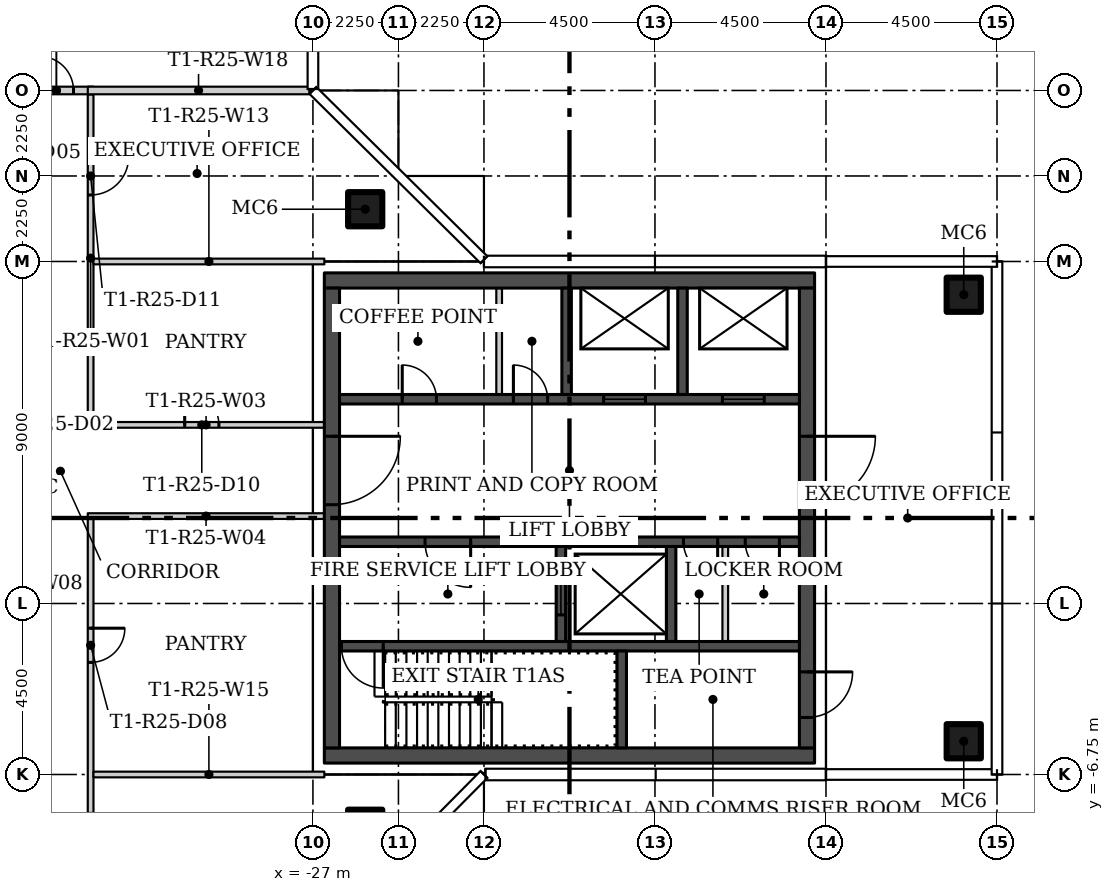
"""IFC4 building model, lengths in metres.
Left out: names, types, materials, properties, quantities, classifications, styles, units other than length and angle.
Written with IfcOpenShell. Run it as: python <this file> out.ifc"""

import sys

from ifc_helpers import new_model, si_unit, direction, frame, frame_2d, origin, origin_2d, place, context, subcontext, project, spatial, rectangle, hollow_rectangle, extrude, element, fill, save


model = new_model("IFC4")
c1 = context("Model", 3, precision=1e-05, world=origin(), true_north=direction((0.0, 1.0)))
c2 = subcontext(c1, "Body", "Model", "MODEL_VIEW")
j1 = project(units=[si_unit("LENGTHUNIT", "METRE"), si_unit("PLANEANGLEUNIT", "RADIAN")], contexts=[c1])
p1 = place(None, origin())
s1 = spatial("IfcSite", under=j1, at=p1, CompositionType="ELEMENT")
p2 = place(p1, origin())
s2 = spatial("IfcBuilding", under=s1, at=p2, CompositionType="ELEMENT")
p3 = place(p2, frame((0.0, 0.0, 230.4)))
s3 = spatial("IfcBuildingStorey", under=s2, at=p3, CompositionType="ELEMENT", Elevation=230.4)
for number, where in (
    (1, (-25.625, 8.125, 0.0)),
    (2, (-25.625, -8.125, 0.0)),
    (3, (-9.875, -5.875, 0.0)),
    (4, (-9.875, 5.875, 0.0)),
):
    element("IfcColumn", number, at=place(p3, frame(where)), inside=s3, PredefinedType="COLUMN", context=c2, shape_type="SweptSolid", body=[
        extrude(hollow_rectangle(XDim=0.9, YDim=0.9, WallThickness=0.036, at=origin_2d()), origin(), (0.0, 0.0, 1.0), 3.55),
    ])
p4 = place(p3, frame((-32.85, 11.15, 0.0), z_axis=(0.0, 0.0, 1.0), x_axis=(0.0, -1.0, 0.0)))
e5 = element("IfcWall", 5, at=p4, inside=s3, PredefinedType="PARTITIONING", context=c2, shape_type="SweptSolid", body=[
    extrude(rectangle(XDim=8.625, YDim=0.15, at=frame_2d((4.312, 0.0))), origin(), (0.0, 0.0, 1.0), 3.55),
])
p5 = place(p4, frame((1.65, 0.0, 0.0)))
e6 = element("IfcOpeningElement", 6, at=p5, cuts=e5, PredefinedType="OPENING", context=c2, shape_type="SweptSolid", body=[
    extrude(rectangle(XDim=1.0, YDim=2.4, at=frame_2d((0.5, 1.2))), frame((0.0, 0.085, 0.0), z_axis=(0.0, -1.0, 0.0), x_axis=(1.0, 0.0, 0.0)), (0.0, 0.0, 1.0), 0.17),
])
p6 = place(p3, frame((-32.85, -0.025, 0.0), z_axis=(0.0, 0.0, 1.0), x_axis=(0.0, -1.0, 0.0)))
e7 = element("IfcWall", 7, at=p6, inside=s3, PredefinedType="PARTITIONING", context=c2, shape_type="SweptSolid", body=[
    extrude(rectangle(XDim=15.65, YDim=0.15, at=frame_2d((7.825, 0.0))), origin(), (0.0, 0.0, 1.0), 3.55),
])
p7 = place(p6, frame((2.875, 0.0, 0.0)))
e8 = element("IfcOpeningElement", 8, at=p7, cuts=e7, PredefinedType="OPENING", context=c2, shape_type="SweptSolid", body=[
    extrude(rectangle(XDim=0.9, YDim=2.1, at=frame_2d((0.45, 1.05))), frame((0.0, 0.085, 0.0), z_axis=(0.0, -1.0, 0.0), x_axis=(1.0, 0.0, 0.0)), (0.0, 0.0, 1.0), 0.17),
])
p8 = place(p6, frame((10.725, 0.0, 0.0)))
e9 = element("IfcOpeningElement", 9, at=p8, cuts=e7, PredefinedType="OPENING", context=c2, shape_type="SweptSolid", body=[
    extrude(rectangle(XDim=1.0, YDim=2.4, at=frame_2d((0.5, 1.2))), frame((0.0, 0.085, 0.0), z_axis=(0.0, -1.0, 0.0), x_axis=(1.0, 0.0, 0.0)), (0.0, 0.0, 1.0), 0.17),
])
p9 = place(p3, frame((-32.925, 2.45, 0.0)))
e10 = element("IfcWall", 10, at=p9, inside=s3, PredefinedType="PARTITIONING", context=c2, shape_type="SweptSolid", body=[
    extrude(rectangle(XDim=6.225, YDim=0.15, at=frame_2d((3.112, 0.0))), origin(), (0.0, 0.0, 1.0), 3.55),
])
p10 = place(p9, frame((2.55, 0.0, 0.0)))
e11 = element("IfcOpeningElement", 11, at=p10, cuts=e10, PredefinedType="OPENING", context=c2, shape_type="SweptSolid", body=[
    extrude(rectangle(XDim=0.9, YDim=2.1, at=frame_2d((0.45, 1.05))), frame((0.0, 0.085, 0.0), z_axis=(0.0, -1.0, 0.0), x_axis=(1.0, 0.0, 0.0)), (0.0, 0.0, 1.0), 0.17),
])
p11 = place(p3, frame((-26.7, 0.05, 0.0), z_axis=(0.0, 0.0, 1.0), x_axis=(-1.0, 0.0, 0.0)))
e12 = element("IfcWall", 12, at=p11, inside=s3, PredefinedType="PARTITIONING", context=c2, shape_type="SweptSolid", body=[
    extrude(rectangle(XDim=6.225, YDim=0.15, at=frame_2d((3.112, 0.0))), origin(), (0.0, 0.0, 1.0), 3.55),
])
p12 = place(p3, frame((-34.725, 11.25, 0.0)))
e13 = element("IfcWall", 13, at=p12, inside=s3, PredefinedType="PARTITIONING", context=c2, shape_type="SweptSolid", body=[
    extrude(rectangle(XDim=1.951, YDim=0.2, at=frame_2d((0.975, 0.0))), origin(), (0.0, 0.0, 1.0), 3.55),
])
p13 = place(p12, frame((0.525, 0.0, 0.0)))
e14 = element("IfcOpeningElement", 14, at=p13, cuts=e13, PredefinedType="OPENING", context=c2, shape_type="SweptSolid", body=[
    extrude(rectangle(XDim=0.9, YDim=2.4, at=frame_2d((0.45, 1.2))), frame((0.0, 0.11, 0.0), z_axis=(0.0, -1.0, 0.0), x_axis=(1.0, 0.0, 0.0)), (0.0, 0.0, 1.0), 0.22),
])
p14 = place(p3, frame((-26.7, 6.75, 0.0), z_axis=(0.0, 0.0, 1.0), x_axis=(-1.0, 0.0, 0.0)))
e15 = element("IfcWall", 15, at=p14, inside=s3, PredefinedType="PARTITIONING", context=c2, shape_type="SweptSolid", body=[
    extrude(rectangle(XDim=6.075, YDim=0.15, at=frame_2d((3.037, 0.0))), origin(), (0.0, 0.0, 1.0), 3.55),
])
p15 = place(p3, frame((-32.775, -6.75, 0.0)))
e16 = element("IfcWall", 16, at=p15, inside=s3, PredefinedType="PARTITIONING", context=c2, shape_type="SweptSolid", body=[
    extrude(rectangle(XDim=6.075, YDim=0.15, at=frame_2d((3.037, 0.0))), origin(), (0.0, 0.0, 1.0), 3.55),
])
p16 = place(p3, frame((-27.095, 11.25, 0.0), z_axis=(0.0, 0.0, 1.0), x_axis=(-1.0, 0.0, 0.0)))
e17 = element("IfcWall", 17, at=p16, inside=s3, PredefinedType="PARTITIONING", context=c2, shape_type="SweptSolid", body=[
    extrude(rectangle(XDim=5.83, YDim=0.2, at=frame_2d((2.915, 0.0))), origin(), (0.0, 0.0, 1.0), 3.55),
])
for number, where in (
    (18, (-26.7, -6.25, 0.0)),
    (19, (-26.7, 6.25, 0.0)),
):
    element("IfcWall", number, at=place(p3, frame(where)), inside=s3, PredefinedType="SHEAR", context=c2, shape_type="SweptSolid", body=[
        extrude(rectangle(XDim=12.9, YDim=0.4, at=frame_2d((6.45, 0.0))), origin(), (0.0, 0.0, 1.0), 3.55),
    ])
p17 = place(p3, frame((-26.5, 6.05, 0.0), z_axis=(0.0, 0.0, 1.0), x_axis=(0.0, -1.0, 0.0)))
e20 = element("IfcWall", 20, at=p17, inside=s3, PredefinedType="SHEAR", context=c2, shape_type="SweptSolid", body=[
    extrude(rectangle(XDim=12.1, YDim=0.4, at=frame_2d((6.05, 0.0))), origin(), (0.0, 0.0, 1.0), 3.55),
])
p18 = place(p17, frame((3.9, 0.0, 0.0)))
e21 = element("IfcOpeningElement", 21, at=p18, cuts=e20, PredefinedType="OPENING", context=c2, shape_type="SweptSolid", body=[
    extrude(rectangle(XDim=1.8, YDim=2.4, at=frame_2d((0.9, 1.2))), frame((0.0, 0.21, 0.0), z_axis=(0.0, -1.0, 0.0), x_axis=(1.0, 0.0, 0.0)), (0.0, 0.0, 1.0), 0.42),
])
p19 = place(p3, frame((-14.0, 6.05, 0.0), z_axis=(0.0, 0.0, 1.0), x_axis=(0.0, -1.0, 0.0)))
e22 = element("IfcWall", 22, at=p19, inside=s3, PredefinedType="SHEAR", context=c2, shape_type="SweptSolid", body=[
    extrude(rectangle(XDim=12.1, YDim=0.4, at=frame_2d((6.05, 0.0))), origin(), (0.0, 0.0, 1.0), 3.55),
])
p20 = place(p19, frame((10.1, 0.0, 0.0)))
e23 = element("IfcOpeningElement", 23, at=p20, cuts=e22, PredefinedType="OPENING", context=c2, shape_type="SweptSolid", body=[
    extrude(rectangle(XDim=1.2, YDim=2.1, at=frame_2d((0.6, 1.05))), frame((0.0, 0.21, 0.0), z_axis=(0.0, -1.0, 0.0), x_axis=(1.0, 0.0, 0.0)), (0.0, 0.0, 1.0), 0.42),
])
p21 = place(p19, frame((3.9, 0.0, 0.0)))
e24 = element("IfcOpeningElement", 24, at=p21, cuts=e22, PredefinedType="OPENING", context=c2, shape_type="SweptSolid", body=[
    extrude(rectangle(XDim=1.8, YDim=2.4, at=frame_2d((0.9, 1.2))), frame((0.0, 0.21, 0.0), z_axis=(0.0, -1.0, 0.0), x_axis=(1.0, 0.0, 0.0)), (0.0, 0.0, 1.0), 0.42),
])
p22 = place(p3, frame((-14.2, -3.375, 0.0), z_axis=(0.0, 0.0, 1.0), x_axis=(-1.0, 0.0, 0.0)))
e25 = element("IfcWall", 25, at=p22, inside=s3, PredefinedType="SHEAR", context=c2, shape_type="SweptSolid", body=[
    extrude(rectangle(XDim=12.1, YDim=0.25, at=frame_2d((6.05, 0.0))), origin(), (0.0, 0.0, 1.0), 3.55),
])
p23 = place(p22, frame((10.95, 0.0, 0.0)))
e26 = element("IfcOpeningElement", 26, at=p23, cuts=e25, PredefinedType="OPENING", context=c2, shape_type="SweptSolid", body=[
    extrude(rectangle(XDim=1.1, YDim=2.1, at=frame_2d((0.55, 1.05))), frame((0.0, 0.135, 0.0), z_axis=(0.0, -1.0, 0.0), x_axis=(1.0, 0.0, 0.0)), (0.0, 0.0, 1.0), 0.27),
])
p24 = place(p3, frame((-18.875, -6.05, 0.0), z_axis=(0.0, 0.0, 1.0), x_axis=(0.0, 1.0, 0.0)))
e27 = element("IfcWall", 27, at=p24, inside=s3, PredefinedType="SHEAR", context=c2, shape_type="SweptSolid", body=[
    extrude(rectangle(XDim=2.55, YDim=0.25, at=frame_2d((1.275, 0.0))), origin(), (0.0, 0.0, 1.0), 3.55),
])
p25 = place(p3, frame((-14.2, -0.625, 0.0), z_axis=(0.0, 0.0, 1.0), x_axis=(-1.0, 0.0, 0.0)))
e28 = element("IfcWall", 28, at=p25, inside=s3, PredefinedType="SHEAR", context=c2, shape_type="SweptSolid", body=[
    extrude(rectangle(XDim=12.1, YDim=0.25, at=frame_2d((6.05, 0.0))), origin(), (0.0, 0.0, 1.0), 3.55),
])
p26 = place(p25, frame((8.65, 0.0, 0.0)))
e29 = element("IfcOpeningElement", 29, at=p26, cuts=e28, PredefinedType="OPENING", context=c2, shape_type="SweptSolid", body=[
    extrude(rectangle(XDim=1.2, YDim=2.1, at=frame_2d((0.6, 1.05))), frame((0.0, 0.135, 0.0), z_axis=(0.0, -1.0, 0.0), x_axis=(1.0, 0.0, 0.0)), (0.0, 0.0, 1.0), 0.27),
])
p27 = place(p25, frame((2.15, 0.0, 0.0)))
e30 = element("IfcOpeningElement", 30, at=p27, cuts=e28, PredefinedType="OPENING", context=c2, shape_type="SweptSolid", body=[
    extrude(rectangle(XDim=0.9, YDim=2.1, at=frame_2d((0.45, 1.05))), frame((0.0, 0.135, 0.0), z_axis=(0.0, -1.0, 0.0), x_axis=(1.0, 0.0, 0.0)), (0.0, 0.0, 1.0), 0.27),
])
p28 = place(p25, frame((0.525, 0.0, 0.0)))
e31 = element("IfcOpeningElement", 31, at=p28, cuts=e28, PredefinedType="OPENING", context=c2, shape_type="SweptSolid", body=[
    extrude(rectangle(XDim=0.9, YDim=2.1, at=frame_2d((0.45, 1.05))), frame((0.0, 0.135, 0.0), z_axis=(0.0, -1.0, 0.0), x_axis=(1.0, 0.0, 0.0)), (0.0, 0.0, 1.0), 0.27),
])
p29 = place(p3, frame((-20.475, -3.25, 0.0), z_axis=(0.0, 0.0, 1.0), x_axis=(0.0, 1.0, 0.0)))
e32 = element("IfcWall", 32, at=p29, inside=s3, PredefinedType="SHEAR", context=c2, shape_type="SweptSolid", body=[
    extrude(rectangle(XDim=2.5, YDim=0.25, at=frame_2d((1.25, 0.0))), origin(), (0.0, 0.0, 1.0), 3.55),
])
p30 = place(p29, frame((0.7, 0.0, 0.0)))
e33 = element("IfcOpeningElement", 33, at=p30, cuts=e32, PredefinedType="OPENING", context=c2, shape_type="SweptSolid", body=[
    extrude(rectangle(XDim=1.1, YDim=2.1, at=frame_2d((0.55, 1.05))), frame((0.0, 0.135, 0.0), z_axis=(0.0, -1.0, 0.0), x_axis=(1.0, 0.0, 0.0)), (0.0, 0.0, 1.0), 0.27),
])
p31 = place(p3, frame((-17.575, -3.25, 0.0), z_axis=(0.0, 0.0, 1.0), x_axis=(0.0, 1.0, 0.0)))
e34 = element("IfcWall", 34, at=p31, inside=s3, PredefinedType="SHEAR", context=c2, shape_type="SweptSolid", body=[
    extrude(rectangle(XDim=2.5, YDim=0.25, at=frame_2d((1.25, 0.0))), origin(), (0.0, 0.0, 1.0), 3.55),
])
p32 = place(p3, frame((-16.15, -3.25, 0.0), z_axis=(0.0, 0.0, 1.0), x_axis=(0.0, 1.0, 0.0)))
e35 = element("IfcWall", 35, at=p32, inside=s3, PredefinedType="PARTITIONING", context=c2, shape_type="SweptSolid", body=[
    extrude(rectangle(XDim=2.5, YDim=0.15, at=frame_2d((1.25, 0.0))), origin(), (0.0, 0.0, 1.0), 3.55),
])
p33 = place(p3, frame((-26.3, 3.125, 0.0)))
e36 = element("IfcWall", 36, at=p33, inside=s3, PredefinedType="SHEAR", context=c2, shape_type="SweptSolid", body=[
    extrude(rectangle(XDim=12.1, YDim=0.25, at=frame_2d((6.05, 0.0))), origin(), (0.0, 0.0, 1.0), 3.55),
])
p34 = place(p33, frame((6.95, 0.0, 0.0)))
e37 = element("IfcOpeningElement", 37, at=p34, cuts=e36, PredefinedType="OPENING", context=c2, shape_type="SweptSolid", body=[
    extrude(rectangle(XDim=1.1, YDim=2.1, at=frame_2d((0.55, 1.05))), frame((0.0, 0.135, 0.0), z_axis=(0.0, -1.0, 0.0), x_axis=(1.0, 0.0, 0.0)), (0.0, 0.0, 1.0), 0.27),
])
p35 = place(p33, frame((10.075, 0.0, 0.0)))
e38 = element("IfcOpeningElement", 38, at=p35, cuts=e36, PredefinedType="OPENING", context=c2, shape_type="SweptSolid", body=[
    extrude(rectangle(XDim=1.1, YDim=2.1, at=frame_2d((0.55, 1.05))), frame((0.0, 0.135, 0.0), z_axis=(0.0, -1.0, 0.0), x_axis=(1.0, 0.0, 0.0)), (0.0, 0.0, 1.0), 0.27),
])
p36 = place(p33, frame((1.65, 0.0, 0.0)))
e39 = element("IfcOpeningElement", 39, at=p36, cuts=e36, PredefinedType="OPENING", context=c2, shape_type="SweptSolid", body=[
    extrude(rectangle(XDim=0.9, YDim=2.1, at=frame_2d((0.45, 1.05))), frame((0.0, 0.135, 0.0), z_axis=(0.0, -1.0, 0.0), x_axis=(1.0, 0.0, 0.0)), (0.0, 0.0, 1.0), 0.27),
])
p37 = place(p33, frame((4.575, 0.0, 0.0)))
e40 = element("IfcOpeningElement", 40, at=p37, cuts=e36, PredefinedType="OPENING", context=c2, shape_type="SweptSolid", body=[
    extrude(rectangle(XDim=0.9, YDim=2.1, at=frame_2d((0.45, 1.05))), frame((0.0, 0.135, 0.0), z_axis=(0.0, -1.0, 0.0), x_axis=(1.0, 0.0, 0.0)), (0.0, 0.0, 1.0), 0.27),
])
for number, where, z_axis, x_axis in (
    (41, (-20.325, 3.25, 0.0), (0.0, 0.0, 1.0), (0.0, 1.0, 0.0)),
    (42, (-17.275, 3.25, 0.0), (0.0, 0.0, 1.0), (0.0, 1.0, 0.0)),
):
    element("IfcWall", number, at=place(p3, frame(where, z_axis=z_axis, x_axis=x_axis)), inside=s3, PredefinedType="SHEAR", context=c2, shape_type="SweptSolid", body=[
        extrude(rectangle(XDim=2.8, YDim=0.25, at=frame_2d((1.4, 0.0))), origin(), (0.0, 0.0, 1.0), 3.55),
    ])
p38 = place(p3, frame((-22.1, 3.25, 0.0), z_axis=(0.0, 0.0, 1.0), x_axis=(0.0, 1.0, 0.0)))
e43 = element("IfcWall", 43, at=p38, inside=s3, PredefinedType="PARTITIONING", context=c2, shape_type="SweptSolid", body=[
    extrude(rectangle(XDim=2.8, YDim=0.15, at=frame_2d((1.4, 0.0))), origin(), (0.0, 0.0, 1.0), 3.55),
])
p39 = place(p13, origin())
e44 = element("IfcDoor", 44, at=p39, inside=s3, OperationType="SINGLE_SWING_LEFT", PredefinedType="DOOR", context=c2, shape_type="SweptSolid", body=[
    extrude(rectangle(XDim=0.9, YDim=2.4, at=frame_2d((0.45, 1.2))), frame((0.0, 0.025, 0.0), z_axis=(0.0, -1.0, 0.0), x_axis=(1.0, 0.0, 0.0)), (0.0, 0.0, 1.0), 0.05),
])
fill(e14, e44)
p40 = place(p7, origin())
e45 = element("IfcDoor", 45, at=p40, inside=s3, OperationType="SINGLE_SWING_RIGHT", PredefinedType="DOOR", context=c2, shape_type="SweptSolid", body=[
    extrude(rectangle(XDim=0.9, YDim=2.1, at=frame_2d((0.45, 1.05))), frame((0.0, 0.025, 0.0), z_axis=(0.0, -1.0, 0.0), x_axis=(1.0, 0.0, 0.0)), (0.0, 0.0, 1.0), 0.05),
])
fill(e8, e45)
p41 = place(p10, origin())
e46 = element("IfcDoor", 46, at=p41, inside=s3, OperationType="SINGLE_SWING_RIGHT", PredefinedType="DOOR", context=c2, shape_type="SweptSolid", body=[
    extrude(rectangle(XDim=0.9, YDim=2.1, at=frame_2d((0.45, 1.05))), frame((0.0, 0.025, 0.0), z_axis=(0.0, -1.0, 0.0), x_axis=(1.0, 0.0, 0.0)), (0.0, 0.0, 1.0), 0.05),
])
fill(e11, e46)
p42 = place(p5, origin())
e47 = element("IfcDoor", 47, at=p42, inside=s3, OperationType="SINGLE_SWING_RIGHT", PredefinedType="DOOR", context=c2, shape_type="SweptSolid", body=[
    extrude(rectangle(XDim=1.0, YDim=2.4, at=frame_2d((0.5, 1.2))), frame((0.0, 0.025, 0.0), z_axis=(0.0, -1.0, 0.0), x_axis=(1.0, 0.0, 0.0)), (0.0, 0.0, 1.0), 0.05),
])
fill(e6, e47)
p43 = place(p18, origin())
e48 = element("IfcDoor", 48, at=p43, inside=s3, OperationType="DOUBLE_DOOR_SINGLE_SWING", PredefinedType="DOOR", context=c2, shape_type="SweptSolid", body=[
    extrude(rectangle(XDim=1.8, YDim=2.4, at=frame_2d((0.9, 1.2))), frame((0.0, 0.025, 0.0), z_axis=(0.0, -1.0, 0.0), x_axis=(1.0, 0.0, 0.0)), (0.0, 0.0, 1.0), 0.05),
])
fill(e21, e48)
p44 = place(p20, origin())
e49 = element("IfcDoor", 49, at=p44, inside=s3, OperationType="SINGLE_SWING_RIGHT", PredefinedType="DOOR", context=c2, shape_type="SweptSolid", body=[
    extrude(rectangle(XDim=1.2, YDim=2.1, at=frame_2d((0.6, 1.05))), frame((0.0, 0.025, 0.0), z_axis=(0.0, -1.0, 0.0), x_axis=(1.0, 0.0, 0.0)), (0.0, 0.0, 1.0), 0.05),
])
fill(e23, e49)
p45 = place(p21, origin())
e50 = element("IfcDoor", 50, at=p45, inside=s3, OperationType="DOUBLE_DOOR_SINGLE_SWING", PredefinedType="DOOR", context=c2, shape_type="SweptSolid", body=[
    extrude(rectangle(XDim=1.8, YDim=2.4, at=frame_2d((0.9, 1.2))), frame((0.0, 0.025, 0.0), z_axis=(0.0, -1.0, 0.0), x_axis=(1.0, 0.0, 0.0)), (0.0, 0.0, 1.0), 0.05),
])
fill(e24, e50)
p46 = place(p23, origin())
e51 = element("IfcDoor", 51, at=p46, inside=s3, OperationType="SINGLE_SWING_RIGHT", PredefinedType="DOOR", context=c2, shape_type="SweptSolid", body=[
    extrude(rectangle(XDim=1.1, YDim=2.1, at=frame_2d((0.55, 1.05))), frame((0.0, 0.025, 0.0), z_axis=(0.0, -1.0, 0.0), x_axis=(1.0, 0.0, 0.0)), (0.0, 0.0, 1.0), 0.05),
])
fill(e26, e51)
p47 = place(p26, origin())
e52 = element("IfcDoor", 52, at=p47, inside=s3, OperationType="SINGLE_SWING_RIGHT", PredefinedType="DOOR", context=c2, shape_type="SweptSolid", body=[
    extrude(rectangle(XDim=1.2, YDim=2.1, at=frame_2d((0.6, 1.05))), frame((0.0, 0.025, 0.0), z_axis=(0.0, -1.0, 0.0), x_axis=(1.0, 0.0, 0.0)), (0.0, 0.0, 1.0), 0.05),
])
fill(e29, e52)
p48 = place(p27, origin())
e53 = element("IfcDoor", 53, at=p48, inside=s3, OperationType="SINGLE_SWING_LEFT", PredefinedType="DOOR", context=c2, shape_type="SweptSolid", body=[
    extrude(rectangle(XDim=0.9, YDim=2.1, at=frame_2d((0.45, 1.05))), frame((0.0, 0.025, 0.0), z_axis=(0.0, -1.0, 0.0), x_axis=(1.0, 0.0, 0.0)), (0.0, 0.0, 1.0), 0.05),
])
fill(e30, e53)
p49 = place(p28, origin())
e54 = element("IfcDoor", 54, at=p49, inside=s3, OperationType="SINGLE_SWING_LEFT", PredefinedType="DOOR", context=c2, shape_type="SweptSolid", body=[
    extrude(rectangle(XDim=0.9, YDim=2.1, at=frame_2d((0.45, 1.05))), frame((0.0, 0.025, 0.0), z_axis=(0.0, -1.0, 0.0), x_axis=(1.0, 0.0, 0.0)), (0.0, 0.0, 1.0), 0.05),
])
fill(e31, e54)
p50 = place(p30, origin())
e55 = element("IfcDoor", 55, at=p50, inside=s3, OperationType="SLIDING_TO_LEFT", PredefinedType="DOOR", context=c2, shape_type="SweptSolid", body=[
    extrude(rectangle(XDim=1.1, YDim=2.1, at=frame_2d((0.55, 1.05))), frame((0.0, 0.025, 0.0), z_axis=(0.0, -1.0, 0.0), x_axis=(1.0, 0.0, 0.0)), (0.0, 0.0, 1.0), 0.05),
])
fill(e33, e55)
p51 = place(p34, origin())
e56 = element("IfcDoor", 56, at=p51, inside=s3, OperationType="SLIDING_TO_LEFT", PredefinedType="DOOR", context=c2, shape_type="SweptSolid", body=[
    extrude(rectangle(XDim=1.1, YDim=2.1, at=frame_2d((0.55, 1.05))), frame((0.0, 0.025, 0.0), z_axis=(0.0, -1.0, 0.0), x_axis=(1.0, 0.0, 0.0)), (0.0, 0.0, 1.0), 0.05),
])
fill(e37, e56)
p52 = place(p35, origin())
e57 = element("IfcDoor", 57, at=p52, inside=s3, OperationType="SLIDING_TO_LEFT", PredefinedType="DOOR", context=c2, shape_type="SweptSolid", body=[
    extrude(rectangle(XDim=1.1, YDim=2.1, at=frame_2d((0.55, 1.05))), frame((0.0, 0.025, 0.0), z_axis=(0.0, -1.0, 0.0), x_axis=(1.0, 0.0, 0.0)), (0.0, 0.0, 1.0), 0.05),
])
fill(e38, e57)
p53 = place(p36, origin())
e58 = element("IfcDoor", 58, at=p53, inside=s3, OperationType="SINGLE_SWING_LEFT", PredefinedType="DOOR", context=c2, shape_type="SweptSolid", body=[
    extrude(rectangle(XDim=0.9, YDim=2.1, at=frame_2d((0.45, 1.05))), frame((0.0, 0.025, 0.0), z_axis=(0.0, -1.0, 0.0), x_axis=(1.0, 0.0, 0.0)), (0.0, 0.0, 1.0), 0.05),
])
fill(e39, e58)
p54 = place(p37, origin())
e59 = element("IfcDoor", 59, at=p54, inside=s3, OperationType="SINGLE_SWING_LEFT", PredefinedType="DOOR", context=c2, shape_type="SweptSolid", body=[
    extrude(rectangle(XDim=0.9, YDim=2.1, at=frame_2d((0.45, 1.05))), frame((0.0, 0.025, 0.0), z_axis=(0.0, -1.0, 0.0), x_axis=(1.0, 0.0, 0.0)), (0.0, 0.0, 1.0), 0.05),
])
fill(e40, e59)
save(model, sys.argv[1])
